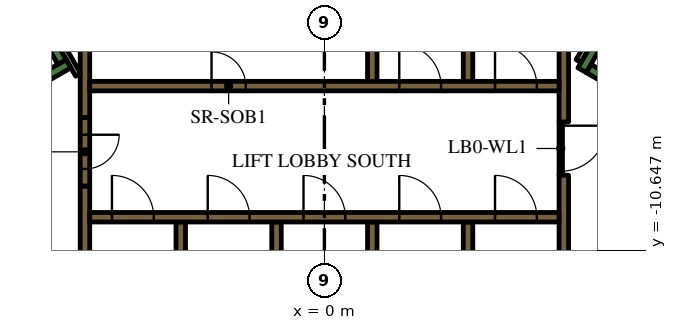
"""IFC4 building model, lengths in metres.
Left out: names, types, materials, properties, quantities, classifications, styles, units other than length and angle.
Written with IfcOpenShell. Run it as: python <this file> out.ifc"""

import sys

from ifc_helpers import new_model, si_unit, direction, frame, frame_2d, origin, place, context, subcontext, project, spatial, rectangle, extrude, element, fill, save


model = new_model("IFC4")
c1 = context("Model", 3, precision=1e-05, world=origin(), true_north=direction((0.0, 1.0)))
c2 = subcontext(c1, "Body", "Model", "MODEL_VIEW")
j1 = project(units=[si_unit("LENGTHUNIT", "METRE"), si_unit("PLANEANGLEUNIT", "RADIAN")], contexts=[c1])
p1 = place(None, origin())
s1 = spatial("IfcSite", under=j1, at=p1, CompositionType="ELEMENT")
p2 = place(p1, origin())
s2 = spatial("IfcBuilding", under=s1, at=p2, CompositionType="ELEMENT")
p3 = place(p2, frame((0.0, 0.0, 111.0)))
s3 = spatial("IfcBuildingStorey", under=s2, at=p3, CompositionType="ELEMENT", Elevation=111.0)
p4 = place(p3, frame((12.84, -9.261, 0.0), z_axis=(0.0, 0.0, 1.0), x_axis=(-0.866013990052, 0.500019768644, 0.0)))
e1 = element("IfcWall", 1, at=p4, inside=s3, PredefinedType="SOLIDWALL", context=c2, shape_type="SweptSolid", body=[
    extrude(rectangle(XDim=6.8, YDim=0.25, at=frame_2d((3.4, 0.0))), origin(), (0.0, 0.0, 1.0), 3.9),
])
p5 = place(p3, frame((6.78, -5.906, 0.0), z_axis=(0.0, 0.0, 1.0), x_axis=(0.500223362819, 0.865896406789, 0.0)))
e2 = element("IfcWall", 2, at=p5, inside=s3, PredefinedType="SOLIDWALL", context=c2, shape_type="SweptSolid", body=[
    extrude(rectangle(XDim=0.675, YDim=0.25, at=frame_2d((0.337, 0.0))), origin(), (0.0, 0.0, 1.0), 3.9),
])
p6 = place(p3, frame((-12.84, -9.261, 0.0), z_axis=(0.0, 0.0, 1.0), x_axis=(0.866016039709, 0.500016218704, 0.0)))
e3 = element("IfcWall", 3, at=p6, inside=s3, PredefinedType="SOLIDWALL", context=c2, shape_type="SweptSolid", body=[
    extrude(rectangle(XDim=7.05, YDim=0.25, at=frame_2d((3.525, 0.0))), origin(), (0.0, 0.0, 1.0), 3.9),
])
p7 = place(p3, frame((-6.905, -5.69, 0.0), z_axis=(0.0, 0.0, 1.0), x_axis=(-0.500402024738, 0.865793170242, 0.0)))
e4 = element("IfcWall", 4, at=p7, inside=s3, PredefinedType="SOLIDWALL", context=c2, shape_type="SweptSolid", body=[
    extrude(rectangle(XDim=0.425, YDim=0.25, at=frame_2d((0.212, 0.0))), origin(), (0.0, 0.0, 1.0), 3.9),
])
p8 = place(p3, frame((-3.78, -12.1, 0.0), z_axis=(0.0, 0.0, 1.0), x_axis=(0.0, 1.0, 0.0)))
e5 = element("IfcWall", 5, at=p8, inside=s3, PredefinedType="SOLIDWALL", context=c2, shape_type="SweptSolid", body=[
    extrude(rectangle(XDim=2.2, YDim=0.25, at=frame_2d((1.1, 0.0))), origin(), (0.0, 0.0, 1.0), 3.9),
])
p9 = place(p3, frame((-6.3, -12.1, 0.0), z_axis=(0.0, 0.0, 1.0), x_axis=(0.0, 1.0, 0.0)))
e6 = element("IfcWall", 6, at=p9, inside=s3, PredefinedType="SOLIDWALL", context=c2, shape_type="SweptSolid", body=[
    extrude(rectangle(XDim=3.146, YDim=0.25, at=frame_2d((1.573, 0.0))), origin(), (0.0, 0.0, 1.0), 3.9),
])
p10 = place(p3, frame((6.3, -8.67, 0.0), z_axis=(0.0, 0.0, 1.0), x_axis=(0.0, -1.0, 0.0)))
e7 = element("IfcWall", 7, at=p10, inside=s3, PredefinedType="SOLIDWALL", context=c2, shape_type="SweptSolid", body=[
    extrude(rectangle(XDim=3.43, YDim=0.25, at=frame_2d((1.715, 0.0))), origin(), (0.0, 0.0, 1.0), 3.9),
])
p11 = place(p3, frame((6.3, -7.268, 0.0), z_axis=(0.0, 0.0, 1.0), x_axis=(0.0, 1.0, 0.0)))
e8 = element("IfcWall", 8, at=p11, inside=s3, PredefinedType="SOLIDWALL", context=c2, shape_type="SweptSolid", body=[
    extrude(rectangle(XDim=3.268, YDim=0.25, at=frame_2d((1.634, 0.0))), origin(), (0.0, 0.0, 1.0), 3.9),
])
for number, where, z_axis, x_axis in (
    (9, (3.78, -4.0, 0.0), (0.0, 0.0, 1.0), (0.0, -1.0, 0.0)),
    (10, (1.26, -4.0, 0.0), (0.0, 0.0, 1.0), (0.0, -1.0, 0.0)),
):
    element("IfcWall", number, at=place(p3, frame(where, z_axis=z_axis, x_axis=x_axis)), inside=s3, PredefinedType="SOLIDWALL", context=c2, shape_type="SweptSolid", body=[
        extrude(rectangle(XDim=2.2, YDim=0.25, at=frame_2d((1.1, 0.0))), origin(), (0.0, 0.0, 1.0), 3.9),
    ])
p12 = place(p3, frame((-6.3, -4.0, 0.0), z_axis=(0.0, 0.0, 1.0), x_axis=(0.0, -1.0, 0.0)))
e11 = element("IfcWall", 11, at=p12, inside=s3, PredefinedType="SOLIDWALL", context=c2, shape_type="SweptSolid", body=[
    extrude(rectangle(XDim=3.154, YDim=0.25, at=frame_2d((1.577, 0.0))), origin(), (0.0, 0.0, 1.0), 3.9),
])
for number, where, z_axis, x_axis in (
    (12, (3.78, -12.1, 0.0), (0.0, 0.0, 1.0), (0.0, 1.0, 0.0)),
    (13, (1.26, -12.1, 0.0), (0.0, 0.0, 1.0), (0.0, 1.0, 0.0)),
    (14, (-1.26, -12.1, 0.0), (0.0, 0.0, 1.0), (0.0, 1.0, 0.0)),
):
    element("IfcWall", number, at=place(p3, frame(where, z_axis=z_axis, x_axis=x_axis)), inside=s3, PredefinedType="SOLIDWALL", context=c2, shape_type="SweptSolid", body=[
        extrude(rectangle(XDim=2.2, YDim=0.25, at=frame_2d((1.1, 0.0))), origin(), (0.0, 0.0, 1.0), 3.9),
    ])
p13 = place(p3, frame((-6.48, -6.027, 0.0), z_axis=(0.0, 0.0, 1.0), x_axis=(-0.499927229454, 0.866067413802, 0.0)))
e15 = element("IfcWall", 15, at=p13, inside=s3, PredefinedType="PARTITIONING", context=c2, shape_type="SweptSolid", body=[
    extrude(rectangle(XDim=0.929, YDim=0.15, at=frame_2d((0.464, 0.0))), origin(), (0.0, 0.0, 1.0), 3.9),
])
p14 = place(p3, frame((6.945, -5.222, 0.0), z_axis=(0.0, 0.0, 1.0), x_axis=(-0.499818422106, -0.866130212453, 0.0)))
e16 = element("IfcWall", 16, at=p14, inside=s3, PredefinedType="PARTITIONING", context=c2, shape_type="SweptSolid", body=[
    extrude(rectangle(XDim=0.514, YDim=0.15, at=frame_2d((0.257, 0.0))), origin(), (0.0, 0.0, 1.0), 2.75),
])
p15 = place(p3, frame((-6.175, -9.775, 0.0), z_axis=(0.0, 0.0, 1.0), x_axis=(1.0, 0.0, 0.0)))
e17 = element("IfcWall", 17, at=p15, inside=s3, PredefinedType="SOLIDWALL", context=c2, shape_type="SweptSolid", body=[
    extrude(rectangle(XDim=12.35, YDim=0.25, at=frame_2d((6.175, 0.0))), origin(), (0.0, 0.0, 1.0), 3.9),
])
p16 = place(p15, frame((0.585, 0.0, 0.0)))
e18 = element("IfcOpeningElement", 18, at=p16, cuts=e17, PredefinedType="OPENING", context=c2, shape_type="SweptSolid", body=[
    extrude(rectangle(XDim=1.1, YDim=2.1, at=frame_2d((0.55, 1.05))), frame((0.0, 0.135, 0.0), z_axis=(0.0, -1.0, 0.0), x_axis=(1.0, 0.0, 0.0)), (0.0, 0.0, 1.0), 0.27),
])
p17 = place(p15, frame((3.105, 0.0, 0.0)))
e19 = element("IfcOpeningElement", 19, at=p17, cuts=e17, PredefinedType="OPENING", context=c2, shape_type="SweptSolid", body=[
    extrude(rectangle(XDim=1.1, YDim=2.1, at=frame_2d((0.55, 1.05))), frame((0.0, 0.135, 0.0), z_axis=(0.0, -1.0, 0.0), x_axis=(1.0, 0.0, 0.0)), (0.0, 0.0, 1.0), 0.27),
])
p18 = place(p15, frame((5.625, 0.0, 0.0)))
e20 = element("IfcOpeningElement", 20, at=p18, cuts=e17, PredefinedType="OPENING", context=c2, shape_type="SweptSolid", body=[
    extrude(rectangle(XDim=1.1, YDim=2.1, at=frame_2d((0.55, 1.05))), frame((0.0, 0.135, 0.0), z_axis=(0.0, -1.0, 0.0), x_axis=(1.0, 0.0, 0.0)), (0.0, 0.0, 1.0), 0.27),
])
p19 = place(p15, frame((8.145, 0.0, 0.0)))
e21 = element("IfcOpeningElement", 21, at=p19, cuts=e17, PredefinedType="OPENING", context=c2, shape_type="SweptSolid", body=[
    extrude(rectangle(XDim=1.1, YDim=2.1, at=frame_2d((0.55, 1.05))), frame((0.0, 0.135, 0.0), z_axis=(0.0, -1.0, 0.0), x_axis=(1.0, 0.0, 0.0)), (0.0, 0.0, 1.0), 0.27),
])
p20 = place(p15, frame((10.665, 0.0, 0.0)))
e22 = element("IfcOpeningElement", 22, at=p20, cuts=e17, PredefinedType="OPENING", context=c2, shape_type="SweptSolid", body=[
    extrude(rectangle(XDim=1.1, YDim=2.1, at=frame_2d((0.55, 1.05))), frame((0.0, 0.135, 0.0), z_axis=(0.0, -1.0, 0.0), x_axis=(1.0, 0.0, 0.0)), (0.0, 0.0, 1.0), 0.27),
])
p21 = place(p3, frame((-6.175, -6.325, 0.0), z_axis=(0.0, 0.0, 1.0), x_axis=(1.0, 0.0, 0.0)))
e23 = element("IfcWall", 23, at=p21, inside=s3, PredefinedType="SOLIDWALL", context=c2, shape_type="SweptSolid", body=[
    extrude(rectangle(XDim=12.35, YDim=0.25, at=frame_2d((6.175, 0.0))), origin(), (0.0, 0.0, 1.0), 3.9),
])
p22 = place(p21, frame((3.205, 0.0, 0.0)))
e24 = element("IfcOpeningElement", 24, at=p22, cuts=e23, PredefinedType="OPENING", context=c2, shape_type="SweptSolid", body=[
    extrude(rectangle(XDim=0.9, YDim=2.1, at=frame_2d((0.45, 1.05))), frame((0.0, 0.135, 0.0), z_axis=(0.0, -1.0, 0.0), x_axis=(1.0, 0.0, 0.0)), (0.0, 0.0, 1.0), 0.27),
])
p23 = place(p21, frame((8.145, 0.0, 0.0)))
e25 = element("IfcOpeningElement", 25, at=p23, cuts=e23, PredefinedType="OPENING", context=c2, shape_type="SweptSolid", body=[
    extrude(rectangle(XDim=1.1, YDim=2.1, at=frame_2d((0.55, 1.05))), frame((0.0, 0.135, 0.0), z_axis=(0.0, -1.0, 0.0), x_axis=(1.0, 0.0, 0.0)), (0.0, 0.0, 1.0), 0.27),
])
p24 = place(p21, frame((10.665, 0.0, 0.0)))
e26 = element("IfcOpeningElement", 26, at=p24, cuts=e23, PredefinedType="OPENING", context=c2, shape_type="SweptSolid", body=[
    extrude(rectangle(XDim=1.1, YDim=2.1, at=frame_2d((0.55, 1.05))), frame((0.0, 0.135, 0.0), z_axis=(0.0, -1.0, 0.0), x_axis=(1.0, 0.0, 0.0)), (0.0, 0.0, 1.0), 0.27),
])
p25 = place(p3, frame((-6.3, -7.154, 0.0), z_axis=(0.0, 0.0, 1.0), x_axis=(0.0, -1.0, 0.0)))
e27 = element("IfcWall", 27, at=p25, inside=s3, PredefinedType="SOLIDWALL", context=c2, shape_type="SweptSolid", body=[
    extrude(rectangle(XDim=1.8, YDim=0.25, at=frame_2d((0.9, 0.0))), origin(), (0.0, 0.0, 1.0), 3.9),
])
p26 = place(p25, frame((0.45, 0.0, 0.0)))
e28 = element("IfcOpeningElement", 28, at=p26, cuts=e27, PredefinedType="OPENING", context=c2, shape_type="SweptSolid", body=[
    extrude(rectangle(XDim=0.9, YDim=2.1, at=frame_2d((0.45, 1.05))), frame((0.0, 0.135, 0.0), z_axis=(0.0, -1.0, 0.0), x_axis=(1.0, 0.0, 0.0)), (0.0, 0.0, 1.0), 0.27),
])
p27 = place(p3, frame((6.22, -7.266, 0.0), z_axis=(0.0, 0.0, 1.0), x_axis=(0.0, -1.0, 0.0)))
e29 = element("IfcWall", 29, at=p27, inside=s3, PredefinedType="PARTITIONING", context=c2, shape_type="SweptSolid", body=[
    extrude(rectangle(XDim=1.4, YDim=0.09, at=frame_2d((0.7, 0.0))), origin(), (0.0, 0.0, 1.0), 2.75),
])
p28 = place(p27, frame((0.1, 0.0, 0.0)))
e30 = element("IfcOpeningElement", 30, at=p28, cuts=e29, PredefinedType="OPENING", context=c2, shape_type="SweptSolid", body=[
    extrude(rectangle(XDim=1.2, YDim=2.1, at=frame_2d((0.6, 1.05))), frame((0.0, 0.055, 0.0), z_axis=(0.0, -1.0, 0.0), x_axis=(1.0, 0.0, 0.0)), (0.0, 0.0, 1.0), 0.11),
])
p29 = place(p16, origin())
e31 = element("IfcDoor", 31, at=p29, inside=s3, OperationType="DOUBLE_DOOR_SLIDING", PredefinedType="DOOR", context=c2, shape_type="SweptSolid", body=[
    extrude(rectangle(XDim=1.1, YDim=2.1, at=frame_2d((0.55, 1.05))), frame((0.0, 0.025, 0.0), z_axis=(0.0, -1.0, 0.0), x_axis=(1.0, 0.0, 0.0)), (0.0, 0.0, 1.0), 0.05),
])
fill(e18, e31)
p30 = place(p17, origin())
e32 = element("IfcDoor", 32, at=p30, inside=s3, OperationType="DOUBLE_DOOR_SLIDING", PredefinedType="DOOR", context=c2, shape_type="SweptSolid", body=[
    extrude(rectangle(XDim=1.1, YDim=2.1, at=frame_2d((0.55, 1.05))), frame((0.0, 0.025, 0.0), z_axis=(0.0, -1.0, 0.0), x_axis=(1.0, 0.0, 0.0)), (0.0, 0.0, 1.0), 0.05),
])
fill(e19, e32)
p31 = place(p18, origin())
e33 = element("IfcDoor", 33, at=p31, inside=s3, OperationType="DOUBLE_DOOR_SLIDING", PredefinedType="DOOR", context=c2, shape_type="SweptSolid", body=[
    extrude(rectangle(XDim=1.1, YDim=2.1, at=frame_2d((0.55, 1.05))), frame((0.0, 0.025, 0.0), z_axis=(0.0, -1.0, 0.0), x_axis=(1.0, 0.0, 0.0)), (0.0, 0.0, 1.0), 0.05),
])
fill(e20, e33)
p32 = place(p19, origin())
e34 = element("IfcDoor", 34, at=p32, inside=s3, OperationType="DOUBLE_DOOR_SLIDING", PredefinedType="DOOR", context=c2, shape_type="SweptSolid", body=[
    extrude(rectangle(XDim=1.1, YDim=2.1, at=frame_2d((0.55, 1.05))), frame((0.0, 0.025, 0.0), z_axis=(0.0, -1.0, 0.0), x_axis=(1.0, 0.0, 0.0)), (0.0, 0.0, 1.0), 0.05),
])
fill(e21, e34)
p33 = place(p20, origin())
e35 = element("IfcDoor", 35, at=p33, inside=s3, OperationType="DOUBLE_DOOR_SLIDING", PredefinedType="DOOR", context=c2, shape_type="SweptSolid", body=[
    extrude(rectangle(XDim=1.1, YDim=2.1, at=frame_2d((0.55, 1.05))), frame((0.0, 0.025, 0.0), z_axis=(0.0, -1.0, 0.0), x_axis=(1.0, 0.0, 0.0)), (0.0, 0.0, 1.0), 0.05),
])
fill(e22, e35)
p34 = place(p22, origin())
e36 = element("IfcDoor", 36, at=p34, inside=s3, OperationType="SINGLE_SWING_LEFT", PredefinedType="DOOR", context=c2, shape_type="SweptSolid", body=[
    extrude(rectangle(XDim=0.9, YDim=2.1, at=frame_2d((0.45, 1.05))), frame((0.0, 0.025, 0.0), z_axis=(0.0, -1.0, 0.0), x_axis=(1.0, 0.0, 0.0)), (0.0, 0.0, 1.0), 0.05),
])
fill(e24, e36)
p35 = place(p23, origin())
e37 = element("IfcDoor", 37, at=p35, inside=s3, OperationType="DOUBLE_DOOR_SLIDING", PredefinedType="DOOR", context=c2, shape_type="SweptSolid", body=[
    extrude(rectangle(XDim=1.1, YDim=2.1, at=frame_2d((0.55, 1.05))), frame((0.0, 0.025, 0.0), z_axis=(0.0, -1.0, 0.0), x_axis=(1.0, 0.0, 0.0)), (0.0, 0.0, 1.0), 0.05),
])
fill(e25, e37)
p36 = place(p24, origin())
e38 = element("IfcDoor", 38, at=p36, inside=s3, OperationType="DOUBLE_DOOR_SLIDING", PredefinedType="DOOR", context=c2, shape_type="SweptSolid", body=[
    extrude(rectangle(XDim=1.1, YDim=2.1, at=frame_2d((0.55, 1.05))), frame((0.0, 0.025, 0.0), z_axis=(0.0, -1.0, 0.0), x_axis=(1.0, 0.0, 0.0)), (0.0, 0.0, 1.0), 0.05),
])
fill(e26, e38)
p37 = place(p26, origin())
e39 = element("IfcDoor", 39, at=p37, inside=s3, OperationType="SINGLE_SWING_LEFT", PredefinedType="DOOR", context=c2, shape_type="SweptSolid", body=[
    extrude(rectangle(XDim=0.9, YDim=2.1, at=frame_2d((0.45, 1.05))), frame((0.0, 0.025, 0.0), z_axis=(0.0, -1.0, 0.0), x_axis=(1.0, 0.0, 0.0)), (0.0, 0.0, 1.0), 0.05),
])
fill(e28, e39)
p38 = place(p28, origin())
e40 = element("IfcDoor", 40, at=p38, inside=s3, OperationType="SINGLE_SWING_LEFT", PredefinedType="DOOR", context=c2, shape_type="SweptSolid", body=[
    extrude(rectangle(XDim=1.2, YDim=2.1, at=frame_2d((0.6, 1.05))), frame((0.0, 0.025, 0.0), z_axis=(0.0, -1.0, 0.0), x_axis=(1.0, 0.0, 0.0)), (0.0, 0.0, 1.0), 0.05),
])
fill(e30, e40)
save(model, sys.argv[1])
